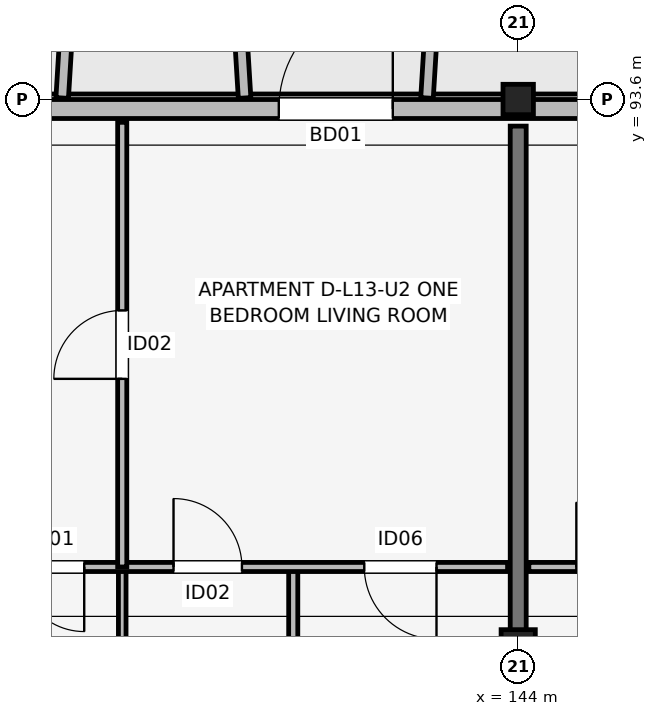
"""IFC4 building model, lengths in metres.
Left out: names, types, materials, properties, quantities, classifications, styles, units other than length and angle.
Written with IfcOpenShell. Run it as: python <this file> out.ifc"""

import sys

from ifc_helpers import new_model, si_unit, direction, frame, frame_2d, origin, origin_2d, place, context, subcontext, project, spatial, rectangle, extrude, element, fill, save


model = new_model("IFC4")
c1 = context("Model", 3, precision=1e-05, world=origin(), true_north=direction((0.0, 1.0)))
c2 = subcontext(c1, "Body", "Model", "MODEL_VIEW")
j1 = project(units=[si_unit("LENGTHUNIT", "METRE"), si_unit("PLANEANGLEUNIT", "RADIAN")], contexts=[c1])
p1 = place(None, origin())
s1 = spatial("IfcSite", under=j1, at=p1, CompositionType="ELEMENT")
p2 = place(p1, origin())
s2 = spatial("IfcBuilding", under=s1, at=p2, CompositionType="ELEMENT")
p3 = place(p2, frame((0.0, 0.0, 43.35)))
s3 = spatial("IfcBuildingStorey", under=s2, at=p3, CompositionType="ELEMENT", Elevation=43.35)
p4 = place(p3, frame((144.0, 86.4, 0.0), z_axis=(0.0, 0.0, 1.0), x_axis=(1.0, 0.0, 0.0)))
e1 = element("IfcColumn", 1, at=p4, inside=s3, PredefinedType="COLUMN", context=c2, shape_type="SweptSolid", body=[
    extrude(rectangle(XDim=0.45, YDim=0.45, at=origin_2d()), origin(), (0.0, 0.0, 1.0), 3.15),
])
p5 = place(p3, frame((144.0, 93.6, 0.0), z_axis=(0.0, 0.0, 1.0), x_axis=(1.0, 0.0, 0.0)))
e2 = element("IfcColumn", 2, at=p5, inside=s3, PredefinedType="COLUMN", context=c2, shape_type="SweptSolid", body=[
    extrude(rectangle(XDim=0.4, YDim=0.4, at=origin_2d()), origin(), (0.0, 0.0, 1.0), 3.15),
])
p6 = place(p3, frame((144.0, 83.85, 0.0), z_axis=(0.0, 0.0, 1.0), x_axis=(0.0, 1.0, 0.0)))
e3 = element("IfcWall", 3, at=p6, inside=s3, PredefinedType="SHEAR", context=c2, shape_type="SweptSolid", body=[
    extrude(rectangle(XDim=9.4, YDim=0.21, at=frame_2d((4.7, 0.0))), origin(), (0.0, 0.0, 1.0), 3.15),
])
p7 = place(p3, frame((162.8, 93.475, 0.0), z_axis=(0.0, 0.0, 1.0), x_axis=(-1.0, 0.0, 0.0)))
e4 = element("IfcWall", 4, at=p7, inside=s3, PredefinedType="SOLIDWALL", context=c2, shape_type="SweptSolid", body=[
    extrude(rectangle(XDim=30.4, YDim=0.25, at=frame_2d((15.2, 0.0))), origin(), (0.0, 0.0, 1.0), 2.45),
])
p8 = place(p7, frame((21.95, 0.0, 0.0), z_axis=(0.0, 0.0, 1.0), x_axis=(-1.0, 0.0, 0.0)))
e5 = element("IfcOpeningElement", 5, at=p8, cuts=e4, PredefinedType="OPENING", context=c2, shape_type="SweptSolid", body=[
    extrude(rectangle(XDim=1.5, YDim=2.15, at=frame_2d((0.75, 1.075))), frame((0.0, 0.135, 0.0), z_axis=(0.0, -1.0, 0.0), x_axis=(1.0, 0.0, 0.0)), (0.0, 0.0, 1.0), 0.27),
])
p9 = place(p7, frame((7.7, 0.0, 0.0), z_axis=(0.0, 0.0, 1.0), x_axis=(-1.0, 0.0, 0.0)))
e6 = element("IfcOpeningElement", 6, at=p9, cuts=e4, PredefinedType="OPENING", context=c2, shape_type="SweptSolid", body=[
    extrude(rectangle(XDim=1.8, YDim=2.15, at=frame_2d((0.9, 1.075))), frame((0.0, 0.135, 0.0), z_axis=(0.0, -1.0, 0.0), x_axis=(1.0, 0.0, 0.0)), (0.0, 0.0, 1.0), 0.27),
])
p10 = place(p7, frame((27.97, 0.0, 0.7)))
e7 = element("IfcOpeningElement", 7, at=p10, cuts=e4, PredefinedType="OPENING", context=c2, shape_type="SweptSolid", body=[
    extrude(rectangle(XDim=1.46, YDim=1.55, at=frame_2d((0.73, 0.775))), frame((0.0, 0.135, 0.0), z_axis=(0.0, -1.0, 0.0), x_axis=(1.0, 0.0, 0.0)), (0.0, 0.0, 1.0), 0.27),
])
p11 = place(p7, frame((26.42, 0.0, 0.75)))
e8 = element("IfcOpeningElement", 8, at=p11, cuts=e4, PredefinedType="OPENING", context=c2, shape_type="SweptSolid", body=[
    extrude(rectangle(XDim=0.6, YDim=1.25, at=frame_2d((0.3, 0.625))), frame((0.0, 0.135, 0.0), z_axis=(0.0, -1.0, 0.0), x_axis=(1.0, 0.0, 0.0)), (0.0, 0.0, 1.0), 0.27),
])
p12 = place(p7, frame((24.98, 0.0, 0.75)))
e9 = element("IfcOpeningElement", 9, at=p12, cuts=e4, PredefinedType="OPENING", context=c2, shape_type="SweptSolid", body=[
    extrude(rectangle(XDim=0.6, YDim=1.25, at=frame_2d((0.3, 0.625))), frame((0.0, 0.135, 0.0), z_axis=(0.0, -1.0, 0.0), x_axis=(1.0, 0.0, 0.0)), (0.0, 0.0, 1.0), 0.27),
])
p13 = place(p7, frame((16.725, 0.0, 0.75)))
e10 = element("IfcOpeningElement", 10, at=p13, cuts=e4, PredefinedType="OPENING", context=c2, shape_type="SweptSolid", body=[
    extrude(rectangle(XDim=0.72, YDim=1.35, at=frame_2d((0.36, 0.675))), frame((0.0, 0.135, 0.0), z_axis=(0.0, -1.0, 0.0), x_axis=(1.0, 0.0, 0.0)), (0.0, 0.0, 1.0), 0.27),
])
p14 = place(p7, frame((12.925, 0.0, 0.69)))
e11 = element("IfcOpeningElement", 11, at=p14, cuts=e4, PredefinedType="OPENING", context=c2, shape_type="SweptSolid", body=[
    extrude(rectangle(XDim=2.15, YDim=1.65, at=frame_2d((1.075, 0.825))), frame((0.0, 0.135, 0.0), z_axis=(0.0, -1.0, 0.0), x_axis=(1.0, 0.0, 0.0)), (0.0, 0.0, 1.0), 0.27),
])
p15 = place(p7, frame((9.525, 0.0, 0.75)))
e12 = element("IfcOpeningElement", 12, at=p15, cuts=e4, PredefinedType="OPENING", context=c2, shape_type="SweptSolid", body=[
    extrude(rectangle(XDim=0.72, YDim=1.35, at=frame_2d((0.36, 0.675))), frame((0.0, 0.135, 0.0), z_axis=(0.0, -1.0, 0.0), x_axis=(1.0, 0.0, 0.0)), (0.0, 0.0, 1.0), 0.27),
])
p16 = place(p7, frame((1.21, 0.0, 0.7)))
e13 = element("IfcOpeningElement", 13, at=p16, cuts=e4, PredefinedType="OPENING", context=c2, shape_type="SweptSolid", body=[
    extrude(rectangle(XDim=1.58, YDim=1.6, at=frame_2d((0.79, 0.8))), frame((0.0, 0.135, 0.0), z_axis=(0.0, -1.0, 0.0), x_axis=(1.0, 0.0, 0.0)), (0.0, 0.0, 1.0), 0.27),
])
for number, where, z_axis, x_axis in (
    (14, (138.0, 93.62, 0.0), (0.0, 0.0, 1.0), (0.061, 0.998, 0.0)),
    (15, (140.4, 93.62, 0.0), (0.0, 0.0, 1.0), (-0.061, 0.998, 0.0)),
    (16, (142.8, 93.62, 0.0), (0.0, 0.0, 1.0), (0.061, 0.998, 0.0)),
):
    element("IfcWall", number, at=place(p3, frame(where, z_axis=z_axis, x_axis=x_axis)), inside=s3, PredefinedType="ELEMENTEDWALL", context=c2, shape_type="SweptSolid", body=[
        extrude(rectangle(XDim=1.964, YDim=0.165, at=frame_2d((0.982, 0.0))), origin(), (0.0, 0.0, 1.0), 2.45),
    ])
p17 = place(p3, frame((138.79, 83.7, 0.0), z_axis=(0.0, 0.0, 1.0), x_axis=(0.0, 1.0, 0.0)))
e17 = element("IfcWall", 17, at=p17, inside=s3, PredefinedType="PARTITIONING", context=c2, shape_type="SweptSolid", body=[
    extrude(rectangle(XDim=3.75, YDim=0.1, at=frame_2d((1.875, 0.0))), origin(), (0.0, 0.0, 1.0), 2.38),
])
p18 = place(p3, frame((141.04, 83.7, 0.0), z_axis=(0.0, 0.0, 1.0), x_axis=(0.0, 1.0, 0.0)))
e18 = element("IfcWall", 18, at=p18, inside=s3, PredefinedType="PARTITIONING", context=c2, shape_type="SweptSolid", body=[
    extrude(rectangle(XDim=3.75, YDim=0.12, at=frame_2d((1.875, 0.0))), origin(), (0.0, 0.0, 1.0), 2.38),
])
p19 = place(p3, frame((136.94, 87.45, 0.0), z_axis=(0.0, 0.0, 1.0), x_axis=(1.0, 0.0, 0.0)))
e19 = element("IfcWall", 19, at=p19, inside=s3, PredefinedType="PARTITIONING", context=c2, shape_type="SweptSolid", body=[
    extrude(rectangle(XDim=6.92, YDim=0.12, at=frame_2d((3.46, 0.0))), origin(), (0.0, 0.0, 1.0), 2.38),
])
p20 = place(p19, frame((1.35, 0.0, 0.0), z_axis=(0.0, 0.0, 1.0), x_axis=(-1.0, 0.0, 0.0)))
e20 = element("IfcOpeningElement", 20, at=p20, cuts=e19, PredefinedType="OPENING", context=c2, shape_type="SweptSolid", body=[
    extrude(rectangle(XDim=0.85, YDim=2.08, at=frame_2d((0.425, 1.04))), frame((0.0, 0.07, 0.0), z_axis=(0.0, -1.0, 0.0), x_axis=(1.0, 0.0, 0.0)), (0.0, 0.0, 1.0), 0.14),
])
p21 = place(p19, frame((2.525, 0.0, 0.0)))
e21 = element("IfcOpeningElement", 21, at=p21, cuts=e19, PredefinedType="OPENING", context=c2, shape_type="SweptSolid", body=[
    extrude(rectangle(XDim=0.9, YDim=2.08, at=frame_2d((0.45, 1.04))), frame((0.0, 0.07, 0.0), z_axis=(0.0, -1.0, 0.0), x_axis=(1.0, 0.0, 0.0)), (0.0, 0.0, 1.0), 0.14),
])
p22 = place(p19, frame((5.985, 0.0, 0.0), z_axis=(0.0, 0.0, 1.0), x_axis=(-1.0, 0.0, 0.0)))
e22 = element("IfcOpeningElement", 22, at=p22, cuts=e19, PredefinedType="OPENING", context=c2, shape_type="SweptSolid", body=[
    extrude(rectangle(XDim=0.95, YDim=2.08, at=frame_2d((0.475, 1.04))), frame((0.0, 0.07, 0.0), z_axis=(0.0, -1.0, 0.0), x_axis=(1.0, 0.0, 0.0)), (0.0, 0.0, 1.0), 0.14),
])
p23 = place(p3, frame((138.79, 87.45, 0.0), z_axis=(0.0, 0.0, 1.0), x_axis=(0.0, 1.0, 0.0)))
e23 = element("IfcWall", 23, at=p23, inside=s3, PredefinedType="PARTITIONING", context=c2, shape_type="SweptSolid", body=[
    extrude(rectangle(XDim=5.85, YDim=0.12, at=frame_2d((2.925, 0.0))), origin(), (0.0, 0.0, 1.0), 2.38),
])
p24 = place(p23, frame((2.475, 0.0, 0.0)))
e24 = element("IfcOpeningElement", 24, at=p24, cuts=e23, PredefinedType="OPENING", context=c2, shape_type="SweptSolid", body=[
    extrude(rectangle(XDim=0.9, YDim=2.08, at=frame_2d((0.45, 1.04))), frame((0.0, 0.07, 0.0), z_axis=(0.0, -1.0, 0.0), x_axis=(1.0, 0.0, 0.0)), (0.0, 0.0, 1.0), 0.14),
])
p25 = place(p3, frame((144.14, 87.45, 0.0), z_axis=(0.0, 0.0, 1.0), x_axis=(1.0, 0.0, 0.0)))
e25 = element("IfcWall", 25, at=p25, inside=s3, PredefinedType="PARTITIONING", context=c2, shape_type="SweptSolid", body=[
    extrude(rectangle(XDim=6.92, YDim=0.12, at=frame_2d((3.46, 0.0))), origin(), (0.0, 0.0, 1.0), 2.38),
])
p26 = place(p25, frame((0.625, 0.0, 0.0)))
e26 = element("IfcOpeningElement", 26, at=p26, cuts=e25, PredefinedType="OPENING", context=c2, shape_type="SweptSolid", body=[
    extrude(rectangle(XDim=0.85, YDim=2.08, at=frame_2d((0.425, 1.04))), frame((0.0, 0.07, 0.0), z_axis=(0.0, -1.0, 0.0), x_axis=(1.0, 0.0, 0.0)), (0.0, 0.0, 1.0), 0.14),
])
p27 = place(p25, frame((3.525, 0.0, 0.0), z_axis=(0.0, 0.0, 1.0), x_axis=(-1.0, 0.0, 0.0)))
e27 = element("IfcOpeningElement", 27, at=p27, cuts=e25, PredefinedType="OPENING", context=c2, shape_type="SweptSolid", body=[
    extrude(rectangle(XDim=0.9, YDim=2.08, at=frame_2d((0.45, 1.04))), frame((0.0, 0.07, 0.0), z_axis=(0.0, -1.0, 0.0), x_axis=(1.0, 0.0, 0.0)), (0.0, 0.0, 1.0), 0.14),
])
p28 = place(p25, frame((5.01, 0.0, 0.0)))
e28 = element("IfcOpeningElement", 28, at=p28, cuts=e25, PredefinedType="OPENING", context=c2, shape_type="SweptSolid", body=[
    extrude(rectangle(XDim=0.95, YDim=2.08, at=frame_2d((0.475, 1.04))), frame((0.0, 0.07, 0.0), z_axis=(0.0, -1.0, 0.0), x_axis=(1.0, 0.0, 0.0)), (0.0, 0.0, 1.0), 0.14),
])
p29 = place(p8, origin())
e29 = element("IfcDoor", 29, at=p29, inside=s3, OperationType="SINGLE_SWING_LEFT", PredefinedType="DOOR", context=c2, shape_type="SweptSolid", body=[
    extrude(rectangle(XDim=1.5, YDim=2.15, at=frame_2d((0.75, 1.075))), frame((0.0, 0.025, 0.0), z_axis=(0.0, -1.0, 0.0), x_axis=(1.0, 0.0, 0.0)), (0.0, 0.0, 1.0), 0.05),
])
fill(e5, e29)
p30 = place(p20, origin())
e30 = element("IfcDoor", 30, at=p30, inside=s3, OperationType="SINGLE_SWING_RIGHT", PredefinedType="DOOR", context=c2, shape_type="SweptSolid", body=[
    extrude(rectangle(XDim=0.85, YDim=2.08, at=frame_2d((0.425, 1.04))), frame((0.0, 0.025, 0.0), z_axis=(0.0, -1.0, 0.0), x_axis=(1.0, 0.0, 0.0)), (0.0, 0.0, 1.0), 0.05),
])
fill(e20, e30)
p31 = place(p21, origin())
e31 = element("IfcDoor", 31, at=p31, inside=s3, OperationType="SINGLE_SWING_LEFT", PredefinedType="DOOR", context=c2, shape_type="SweptSolid", body=[
    extrude(rectangle(XDim=0.9, YDim=2.08, at=frame_2d((0.45, 1.04))), frame((0.0, 0.025, 0.0), z_axis=(0.0, -1.0, 0.0), x_axis=(1.0, 0.0, 0.0)), (0.0, 0.0, 1.0), 0.05),
])
fill(e21, e31)
p32 = place(p22, origin())
e32 = element("IfcDoor", 32, at=p32, inside=s3, OperationType="SINGLE_SWING_RIGHT", PredefinedType="DOOR", context=c2, shape_type="SweptSolid", body=[
    extrude(rectangle(XDim=0.95, YDim=2.08, at=frame_2d((0.475, 1.04))), frame((0.0, 0.025, 0.0), z_axis=(0.0, -1.0, 0.0), x_axis=(1.0, 0.0, 0.0)), (0.0, 0.0, 1.0), 0.05),
])
fill(e22, e32)
p33 = place(p24, origin())
e33 = element("IfcDoor", 33, at=p33, inside=s3, OperationType="SINGLE_SWING_LEFT", PredefinedType="DOOR", context=c2, shape_type="SweptSolid", body=[
    extrude(rectangle(XDim=0.9, YDim=2.08, at=frame_2d((0.45, 1.04))), frame((0.0, 0.025, 0.0), z_axis=(0.0, -1.0, 0.0), x_axis=(1.0, 0.0, 0.0)), (0.0, 0.0, 1.0), 0.05),
])
fill(e24, e33)
p34 = place(p26, origin())
e34 = element("IfcDoor", 34, at=p34, inside=s3, OperationType="SINGLE_SWING_LEFT", PredefinedType="DOOR", context=c2, shape_type="SweptSolid", body=[
    extrude(rectangle(XDim=0.85, YDim=2.08, at=frame_2d((0.425, 1.04))), frame((0.0, 0.025, 0.0), z_axis=(0.0, -1.0, 0.0), x_axis=(1.0, 0.0, 0.0)), (0.0, 0.0, 1.0), 0.05),
])
fill(e26, e34)
save(model, sys.argv[1])
